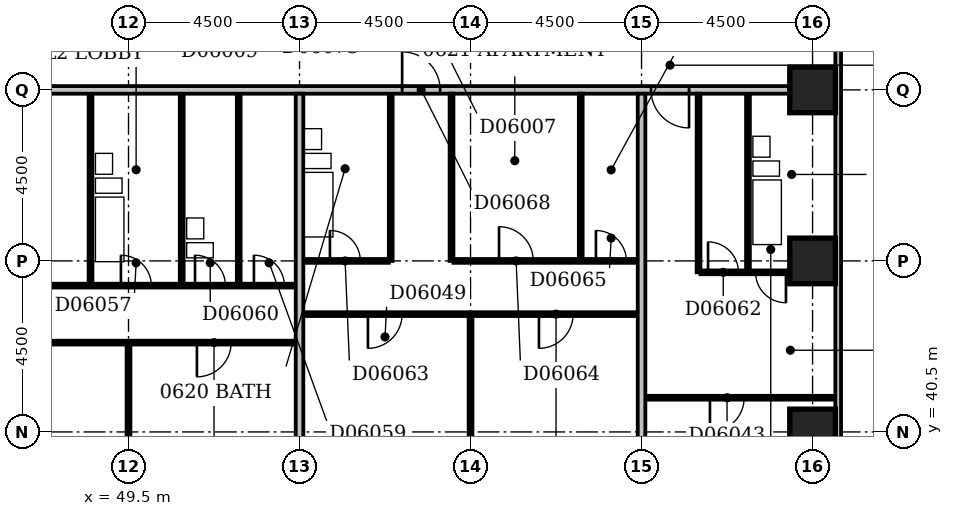
"""IFC4 building model, lengths in metres.
Left out: names, types, materials, properties, quantities, classifications, styles, units other than length and angle.
Written with IfcOpenShell. Run it as: python <this file> out.ifc"""

import sys

from ifc_helpers import new_model, si_unit, direction, frame, frame_2d, origin, origin_2d, place, context, subcontext, project, spatial, rectangle, extrude, element, fill, save


model = new_model("IFC4")
c1 = context("Model", 3, precision=1e-05, world=origin(), true_north=direction((0.0, 1.0)))
c2 = subcontext(c1, "Body", "Model", "MODEL_VIEW")
j1 = project(units=[si_unit("LENGTHUNIT", "METRE"), si_unit("PLANEANGLEUNIT", "RADIAN")], contexts=[c1])
p1 = place(None, origin())
s1 = spatial("IfcSite", under=j1, at=p1, CompositionType="ELEMENT")
p2 = place(p1, origin())
s2 = spatial("IfcBuilding", under=s1, at=p2, CompositionType="ELEMENT")
p3 = place(p2, frame((0.0, 0.0, 32.6)))
s3 = spatial("IfcBuildingStorey", under=s2, at=p3, CompositionType="ELEMENT", Elevation=32.6)
for number, where, z_axis, x_axis in (
    (1, (67.5, 40.5, -0.3), (0.0, 0.0, 1.0), (1.0, 0.0, 0.0)),
    (2, (67.5, 45.0, -0.3), (0.0, 0.0, 1.0), (1.0, 0.0, 0.0)),
    (3, (67.5, 49.5, -0.3), (0.0, 0.0, 1.0), (1.0, 0.0, 0.0)),
):
    element("IfcColumn", number, at=place(p3, frame(where, z_axis=z_axis, x_axis=x_axis)), inside=s3, PredefinedType="COLUMN", context=c2, shape_type="SweptSolid", body=[
        extrude(rectangle(XDim=1.2, YDim=1.2, at=origin_2d()), origin(), (0.0, 0.0, 1.0), 3.6),
    ])
p4 = place(p3, frame((68.175, 35.4, 0.0), z_axis=(0.0, 0.0, 1.0), x_axis=(0.0, 1.0, 0.0)))
e4 = element("IfcWall", 4, at=p4, inside=s3, PredefinedType="STANDARD", context=c2, shape_type="SweptSolid", body=[
    extrude(rectangle(XDim=23.85, YDim=0.15, at=frame_2d((11.925, 0.0))), origin(), (0.0, 0.0, 1.0), 2.7),
])
p5 = place(p4, frame((1.65, 0.0, 0.6)))
e5 = element("IfcOpeningElement", 5, at=p5, cuts=e4, PredefinedType="OPENING", context=c2, shape_type="SweptSolid", body=[
    extrude(rectangle(XDim=2.4, YDim=1.8, at=frame_2d((1.2, 0.9))), frame((0.0, 0.087, 0.0), z_axis=(0.0, -1.0, 0.0), x_axis=(1.0, 0.0, 0.0)), (0.0, 0.0, 1.0), 0.174),
])
p6 = place(p4, frame((19.65, 0.0, 0.6)))
e6 = element("IfcOpeningElement", 6, at=p6, cuts=e4, PredefinedType="OPENING", context=c2, shape_type="SweptSolid", body=[
    extrude(rectangle(XDim=2.4, YDim=1.8, at=frame_2d((1.2, 0.9))), frame((0.0, 0.087, 0.0), z_axis=(0.0, -1.0, 0.0), x_axis=(1.0, 0.0, 0.0)), (0.0, 0.0, 1.0), 0.174),
])
p7 = place(p3, frame((49.5, 36.6, 0.0), z_axis=(0.0, 0.0, 1.0), x_axis=(0.0, 1.0, 0.0)))
e7 = element("IfcWall", 7, at=p7, inside=s3, PredefinedType="PARTITIONING", context=c2, shape_type="SweptSolid", body=[
    extrude(rectangle(XDim=6.2, YDim=0.1, at=frame_2d((3.1, 0.0))), origin(), (0.0, 0.0, 1.0), 3.3),
])
p8 = place(p3, frame((54.0, 36.6, 0.0), z_axis=(0.0, 0.0, 1.0), x_axis=(0.0, 1.0, 0.0)))
e8 = element("IfcWall", 8, at=p8, inside=s3, PredefinedType="PARTITIONING", context=c2, shape_type="SweptSolid", body=[
    extrude(rectangle(XDim=12.8, YDim=0.2, at=frame_2d((6.4, 0.0))), origin(), (0.0, 0.0, 1.0), 2.6),
])
p9 = place(p3, frame((58.5, 36.6, 0.0), z_axis=(0.0, 0.0, 1.0), x_axis=(0.0, 1.0, 0.0)))
e9 = element("IfcWall", 9, at=p9, inside=s3, PredefinedType="PARTITIONING", context=c2, shape_type="SweptSolid", body=[
    extrude(rectangle(XDim=6.95, YDim=0.1, at=frame_2d((3.475, 0.0))), origin(), (0.0, 0.0, 1.0), 3.3),
])
p10 = place(p3, frame((63.0, 36.6, 0.0), z_axis=(0.0, 0.0, 1.0), x_axis=(0.0, 1.0, 0.0)))
e10 = element("IfcWall", 10, at=p10, inside=s3, PredefinedType="PARTITIONING", context=c2, shape_type="SweptSolid", body=[
    extrude(rectangle(XDim=12.8, YDim=0.2, at=frame_2d((6.4, 0.0))), origin(), (0.0, 0.0, 1.0), 2.4),
])
p11 = place(p3, frame((63.1, 41.4, 0.0), z_axis=(0.0, 0.0, 1.0), x_axis=(1.0, 0.0, 0.0)))
e11 = element("IfcWall", 11, at=p11, inside=s3, PredefinedType="PARTITIONING", context=c2, shape_type="SweptSolid", body=[
    extrude(rectangle(XDim=5.0, YDim=0.1, at=frame_2d((2.5, 0.0))), origin(), (0.0, 0.0, 1.0), 3.3),
])
p12 = place(p11, frame((1.7, 0.0, 0.0)))
e12 = element("IfcOpeningElement", 12, at=p12, cuts=e11, PredefinedType="OPENING", context=c2, shape_type="SweptSolid", body=[
    extrude(rectangle(XDim=0.9, YDim=2.1, at=frame_2d((0.45, 1.05))), frame((0.0, 0.062, 0.0), z_axis=(0.0, -1.0, 0.0), x_axis=(1.0, 0.0, 0.0)), (0.0, 0.0, 1.0), 0.124),
])
p13 = place(p3, frame((40.6, 42.85, 0.0), z_axis=(0.0, 0.0, 1.0), x_axis=(1.0, 0.0, 0.0)))
e13 = element("IfcWall", 13, at=p13, inside=s3, PredefinedType="PARTITIONING", context=c2, shape_type="SweptSolid", body=[
    extrude(rectangle(XDim=13.3, YDim=0.1, at=frame_2d((6.65, 0.0))), origin(), (0.0, 0.0, 1.0), 3.3),
])
p14 = place(p13, frame((3.9, 0.0, 0.0)))
e14 = element("IfcOpeningElement", 14, at=p14, cuts=e13, PredefinedType="OPENING", context=c2, shape_type="SweptSolid", body=[
    extrude(rectangle(XDim=0.9, YDim=2.1, at=frame_2d((0.45, 1.05))), frame((0.0, 0.062, 0.0), z_axis=(0.0, -1.0, 0.0), x_axis=(1.0, 0.0, 0.0)), (0.0, 0.0, 1.0), 0.124),
])
p15 = place(p13, frame((10.7, 0.0, 0.0)))
e15 = element("IfcOpeningElement", 15, at=p15, cuts=e13, PredefinedType="OPENING", context=c2, shape_type="SweptSolid", body=[
    extrude(rectangle(XDim=0.9, YDim=2.1, at=frame_2d((0.45, 1.05))), frame((0.0, 0.062, 0.0), z_axis=(0.0, -1.0, 0.0), x_axis=(1.0, 0.0, 0.0)), (0.0, 0.0, 1.0), 0.124),
])
p16 = place(p3, frame((54.1, 43.6, 0.0), z_axis=(0.0, 0.0, 1.0), x_axis=(1.0, 0.0, 0.0)))
e16 = element("IfcWall", 16, at=p16, inside=s3, PredefinedType="PARTITIONING", context=c2, shape_type="SweptSolid", body=[
    extrude(rectangle(XDim=8.8, YDim=0.1, at=frame_2d((4.4, 0.0))), origin(), (0.0, 0.0, 1.0), 3.3),
])
p17 = place(p16, frame((1.7, 0.0, 0.0)))
e17 = element("IfcOpeningElement", 17, at=p17, cuts=e16, PredefinedType="OPENING", context=c2, shape_type="SweptSolid", body=[
    extrude(rectangle(XDim=0.9, YDim=2.1, at=frame_2d((0.45, 1.05))), frame((0.0, 0.062, 0.0), z_axis=(0.0, -1.0, 0.0), x_axis=(1.0, 0.0, 0.0)), (0.0, 0.0, 1.0), 0.124),
])
p18 = place(p16, frame((6.2, 0.0, 0.0)))
e18 = element("IfcOpeningElement", 18, at=p18, cuts=e16, PredefinedType="OPENING", context=c2, shape_type="SweptSolid", body=[
    extrude(rectangle(XDim=0.9, YDim=2.1, at=frame_2d((0.45, 1.05))), frame((0.0, 0.062, 0.0), z_axis=(0.0, -1.0, 0.0), x_axis=(1.0, 0.0, 0.0)), (0.0, 0.0, 1.0), 0.124),
])
p19 = place(p3, frame((42.15, 44.35, 0.0), z_axis=(0.0, 0.0, 1.0), x_axis=(1.0, 0.0, 0.0)))
e19 = element("IfcWall", 19, at=p19, inside=s3, PredefinedType="PARTITIONING", context=c2, shape_type="SweptSolid", body=[
    extrude(rectangle(XDim=11.75, YDim=0.1, at=frame_2d((5.875, 0.0))), origin(), (0.0, 0.0, 1.0), 3.3),
])
p20 = place(p19, frame((7.15, 0.0, 0.0)))
e20 = element("IfcOpeningElement", 20, at=p20, cuts=e19, PredefinedType="OPENING", context=c2, shape_type="SweptSolid", body=[
    extrude(rectangle(XDim=0.8, YDim=2.1, at=frame_2d((0.4, 1.05))), frame((0.0, 0.062, 0.0), z_axis=(0.0, -1.0, 0.0), x_axis=(1.0, 0.0, 0.0)), (0.0, 0.0, 1.0), 0.124),
])
p21 = place(p19, frame((2.7, 0.0, 0.0)))
e21 = element("IfcOpeningElement", 21, at=p21, cuts=e19, PredefinedType="OPENING", context=c2, shape_type="SweptSolid", body=[
    extrude(rectangle(XDim=0.9, YDim=2.1, at=frame_2d((0.45, 1.05))), frame((0.0, 0.062, 0.0), z_axis=(0.0, -1.0, 0.0), x_axis=(1.0, 0.0, 0.0)), (0.0, 0.0, 1.0), 0.124),
])
p22 = place(p19, frame((10.65, 0.0, 0.0)))
e22 = element("IfcOpeningElement", 22, at=p22, cuts=e19, PredefinedType="OPENING", context=c2, shape_type="SweptSolid", body=[
    extrude(rectangle(XDim=0.8, YDim=2.1, at=frame_2d((0.4, 1.05))), frame((0.0, 0.062, 0.0), z_axis=(0.0, -1.0, 0.0), x_axis=(1.0, 0.0, 0.0)), (0.0, 0.0, 1.0), 0.124),
])
p23 = place(p19, frame((9.1, 0.0, 0.0)))
e23 = element("IfcOpeningElement", 23, at=p23, cuts=e19, PredefinedType="OPENING", context=c2, shape_type="SweptSolid", body=[
    extrude(rectangle(XDim=0.8, YDim=2.1, at=frame_2d((0.4, 1.05))), frame((0.0, 0.062, 0.0), z_axis=(0.0, -1.0, 0.0), x_axis=(1.0, 0.0, 0.0)), (0.0, 0.0, 1.0), 0.124),
])
for number, where, z_axis, x_axis in (
    (24, (48.5, 44.4, 0.0), (0.0, 0.0, 1.0), (0.0, 1.0, 0.0)),
    (25, (50.9, 44.4, 0.0), (0.0, 0.0, 1.0), (0.0, 1.0, 0.0)),
    (26, (52.4, 44.4, 0.0), (0.0, 0.0, 1.0), (0.0, 1.0, 0.0)),
):
    element("IfcWall", number, at=place(p3, frame(where, z_axis=z_axis, x_axis=x_axis)), inside=s3, PredefinedType="PLUMBINGWALL", context=c2, shape_type="SweptSolid", body=[
        extrude(rectangle(XDim=5.0, YDim=0.1, at=frame_2d((2.5, 0.0))), origin(), (0.0, 0.0, 1.0), 3.3),
    ])
p24 = place(p3, frame((64.5, 44.7, 0.0), z_axis=(0.0, 0.0, 1.0), x_axis=(0.0, 1.0, 0.0)))
e27 = element("IfcWall", 27, at=p24, inside=s3, PredefinedType="PARTITIONING", context=c2, shape_type="SweptSolid", body=[
    extrude(rectangle(XDim=4.7, YDim=0.1, at=frame_2d((2.35, 0.0))), origin(), (0.0, 0.0, 1.0), 3.3),
])
p25 = place(p3, frame((64.55, 44.7, 0.0), z_axis=(0.0, 0.0, 1.0), x_axis=(1.0, 0.0, 0.0)))
e28 = element("IfcWall", 28, at=p25, inside=s3, PredefinedType="PARTITIONING", context=c2, shape_type="SweptSolid", body=[
    extrude(rectangle(XDim=2.35, YDim=0.1, at=frame_2d((1.175, 0.0))), origin(), (0.0, 0.0, 1.0), 3.3),
])
p26 = place(p25, frame((1.45, 0.0, 0.0)))
e29 = element("IfcOpeningElement", 29, at=p26, cuts=e28, PredefinedType="OPENING", context=c2, shape_type="SweptSolid", body=[
    extrude(rectangle(XDim=0.8, YDim=2.1, at=frame_2d((0.4, 1.05))), frame((0.0, 0.062, 0.0), z_axis=(0.0, -1.0, 0.0), x_axis=(1.0, 0.0, 0.0)), (0.0, 0.0, 1.0), 0.124),
])
p27 = place(p25, frame((0.2, 0.0, 0.0)))
e30 = element("IfcOpeningElement", 30, at=p27, cuts=e28, PredefinedType="OPENING", context=c2, shape_type="SweptSolid", body=[
    extrude(rectangle(XDim=0.8, YDim=2.1, at=frame_2d((0.4, 1.05))), frame((0.0, 0.062, 0.0), z_axis=(0.0, -1.0, 0.0), x_axis=(1.0, 0.0, 0.0)), (0.0, 0.0, 1.0), 0.124),
])
p28 = place(p3, frame((65.8, 44.75, 0.0), z_axis=(0.0, 0.0, 1.0), x_axis=(0.0, 1.0, 0.0)))
e31 = element("IfcWall", 31, at=p28, inside=s3, PredefinedType="PLUMBINGWALL", context=c2, shape_type="SweptSolid", body=[
    extrude(rectangle(XDim=4.65, YDim=0.1, at=frame_2d((2.325, 0.0))), origin(), (0.0, 0.0, 1.0), 3.3),
])
p29 = place(p3, frame((54.1, 45.0, 0.0), z_axis=(0.0, 0.0, 1.0), x_axis=(1.0, 0.0, 0.0)))
e32 = element("IfcWall", 32, at=p29, inside=s3, PredefinedType="PARTITIONING", context=c2, shape_type="SweptSolid", body=[
    extrude(rectangle(XDim=2.25, YDim=0.1, at=frame_2d((1.125, 0.0))), origin(), (0.0, 0.0, 1.0), 3.3),
])
p30 = place(p29, frame((0.7, 0.0, 0.0)))
e33 = element("IfcOpeningElement", 33, at=p30, cuts=e32, PredefinedType="OPENING", context=c2, shape_type="SweptSolid", body=[
    extrude(rectangle(XDim=0.8, YDim=2.1, at=frame_2d((0.4, 1.05))), frame((0.0, 0.062, 0.0), z_axis=(0.0, -1.0, 0.0), x_axis=(1.0, 0.0, 0.0)), (0.0, 0.0, 1.0), 0.124),
])
p31 = place(p3, frame((56.4, 45.0, 0.0), z_axis=(0.0, 0.0, 1.0), x_axis=(0.0, 1.0, 0.0)))
e34 = element("IfcWall", 34, at=p31, inside=s3, PredefinedType="PLUMBINGWALL", context=c2, shape_type="SweptSolid", body=[
    extrude(rectangle(XDim=4.4, YDim=0.1, at=frame_2d((2.2, 0.0))), origin(), (0.0, 0.0, 1.0), 3.3),
])
p32 = place(p3, frame((58.0, 45.0, 0.0), z_axis=(0.0, 0.0, 1.0), x_axis=(0.0, 1.0, 0.0)))
e35 = element("IfcWall", 35, at=p32, inside=s3, PredefinedType="PARTITIONING", context=c2, shape_type="SweptSolid", body=[
    extrude(rectangle(XDim=4.4, YDim=0.1, at=frame_2d((2.2, 0.0))), origin(), (0.0, 0.0, 1.0), 3.3),
])
p33 = place(p3, frame((58.05, 45.0, 0.0), z_axis=(0.0, 0.0, 1.0), x_axis=(1.0, 0.0, 0.0)))
e36 = element("IfcWall", 36, at=p33, inside=s3, PredefinedType="PARTITIONING", context=c2, shape_type="SweptSolid", body=[
    extrude(rectangle(XDim=4.85, YDim=0.1, at=frame_2d((2.425, 0.0))), origin(), (0.0, 0.0, 1.0), 3.3),
])
p34 = place(p33, frame((1.2, 0.0, 0.0)))
e37 = element("IfcOpeningElement", 37, at=p34, cuts=e36, PredefinedType="OPENING", context=c2, shape_type="SweptSolid", body=[
    extrude(rectangle(XDim=0.9, YDim=2.1, at=frame_2d((0.45, 1.05))), frame((0.0, 0.062, 0.0), z_axis=(0.0, -1.0, 0.0), x_axis=(1.0, 0.0, 0.0)), (0.0, 0.0, 1.0), 0.124),
])
p35 = place(p33, frame((3.75, 0.0, 0.0)))
e38 = element("IfcOpeningElement", 38, at=p35, cuts=e36, PredefinedType="OPENING", context=c2, shape_type="SweptSolid", body=[
    extrude(rectangle(XDim=0.8, YDim=2.1, at=frame_2d((0.4, 1.05))), frame((0.0, 0.062, 0.0), z_axis=(0.0, -1.0, 0.0), x_axis=(1.0, 0.0, 0.0)), (0.0, 0.0, 1.0), 0.124),
])
p36 = place(p3, frame((61.4, 45.05, 0.0), z_axis=(0.0, 0.0, 1.0), x_axis=(0.0, 1.0, 0.0)))
e39 = element("IfcWall", 39, at=p36, inside=s3, PredefinedType="PARTITIONING", context=c2, shape_type="SweptSolid", body=[
    extrude(rectangle(XDim=4.35, YDim=0.1, at=frame_2d((2.175, 0.0))), origin(), (0.0, 0.0, 1.0), 3.3),
])
p37 = place(p3, frame((9.1, 49.5, 0.0), z_axis=(0.0, 0.0, 1.0), x_axis=(1.0, 0.0, 0.0)))
e40 = element("IfcWall", 40, at=p37, inside=s3, PredefinedType="PARTITIONING", context=c2, shape_type="SweptSolid", body=[
    extrude(rectangle(XDim=57.8, YDim=0.2, at=frame_2d((28.9, 0.0))), origin(), (0.0, 0.0, 1.0), 3.3),
])
p38 = place(p37, frame((20.6, 0.0, 0.0)))
e41 = element("IfcOpeningElement", 41, at=p38, cuts=e40, PredefinedType="OPENING", context=c2, shape_type="SweptSolid", body=[
    extrude(rectangle(XDim=1.0, YDim=2.1, at=frame_2d((0.5, 1.05))), frame((0.0, 0.112, 0.0), z_axis=(0.0, -1.0, 0.0), x_axis=(1.0, 0.0, 0.0)), (0.0, 0.0, 1.0), 0.224),
])
p39 = place(p37, frame((31.7, 0.0, 0.0)))
e42 = element("IfcOpeningElement", 42, at=p39, cuts=e40, PredefinedType="OPENING", context=c2, shape_type="SweptSolid", body=[
    extrude(rectangle(XDim=1.0, YDim=2.1, at=frame_2d((0.5, 1.05))), frame((0.0, 0.112, 0.0), z_axis=(0.0, -1.0, 0.0), x_axis=(1.0, 0.0, 0.0)), (0.0, 0.0, 1.0), 0.224),
])
p40 = place(p37, frame((47.6, 0.0, 0.0)))
e43 = element("IfcOpeningElement", 43, at=p40, cuts=e40, PredefinedType="OPENING", context=c2, shape_type="SweptSolid", body=[
    extrude(rectangle(XDim=1.0, YDim=2.1, at=frame_2d((0.5, 1.05))), frame((0.0, 0.112, 0.0), z_axis=(0.0, -1.0, 0.0), x_axis=(1.0, 0.0, 0.0)), (0.0, 0.0, 1.0), 0.224),
])
p41 = place(p37, frame((54.15, 0.0, 0.0)))
e44 = element("IfcOpeningElement", 44, at=p41, cuts=e40, PredefinedType="OPENING", context=c2, shape_type="SweptSolid", body=[
    extrude(rectangle(XDim=1.0, YDim=2.1, at=frame_2d((0.5, 1.05))), frame((0.0, 0.112, 0.0), z_axis=(0.0, -1.0, 0.0), x_axis=(1.0, 0.0, 0.0)), (0.0, 0.0, 1.0), 0.224),
])
p42 = place(p37, frame((10.65, 0.0, 0.0)))
e45 = element("IfcOpeningElement", 45, at=p42, cuts=e40, PredefinedType="OPENING", context=c2, shape_type="SweptSolid", body=[
    extrude(rectangle(XDim=0.9, YDim=2.1, at=frame_2d((0.45, 1.05))), frame((0.0, 0.112, 0.0), z_axis=(0.0, -1.0, 0.0), x_axis=(1.0, 0.0, 0.0)), (0.0, 0.0, 1.0), 0.224),
])
p43 = place(p12, frame((0.9, 0.0, 0.0), z_axis=(0.0, 0.0, 1.0), x_axis=(-1.0, 0.0, 0.0)))
e46 = element("IfcDoor", 46, at=p43, inside=s3, OperationType="SINGLE_SWING_RIGHT", PredefinedType="DOOR", context=c2, shape_type="SweptSolid", body=[
    extrude(rectangle(XDim=0.9, YDim=2.1, at=frame_2d((0.45, 1.05))), frame((0.0, 0.025, 0.0), z_axis=(0.0, -1.0, 0.0), x_axis=(1.0, 0.0, 0.0)), (0.0, 0.0, 1.0), 0.05),
])
fill(e12, e46)
p44 = place(p15, frame((0.9, 0.0, 0.0), z_axis=(0.0, 0.0, 1.0), x_axis=(-1.0, 0.0, 0.0)))
e47 = element("IfcDoor", 47, at=p44, inside=s3, OperationType="SINGLE_SWING_RIGHT", PredefinedType="DOOR", context=c2, shape_type="SweptSolid", body=[
    extrude(rectangle(XDim=0.9, YDim=2.1, at=frame_2d((0.45, 1.05))), frame((0.0, 0.025, 0.0), z_axis=(0.0, -1.0, 0.0), x_axis=(1.0, 0.0, 0.0)), (0.0, 0.0, 1.0), 0.05),
])
fill(e15, e47)
p45 = place(p17, frame((0.9, 0.0, 0.0), z_axis=(0.0, 0.0, 1.0), x_axis=(-1.0, 0.0, 0.0)))
e48 = element("IfcDoor", 48, at=p45, inside=s3, OperationType="SINGLE_SWING_RIGHT", PredefinedType="DOOR", context=c2, shape_type="SweptSolid", body=[
    extrude(rectangle(XDim=0.9, YDim=2.1, at=frame_2d((0.45, 1.05))), frame((0.0, 0.025, 0.0), z_axis=(0.0, -1.0, 0.0), x_axis=(1.0, 0.0, 0.0)), (0.0, 0.0, 1.0), 0.05),
])
fill(e17, e48)
p46 = place(p18, frame((0.9, 0.0, 0.0), z_axis=(0.0, 0.0, 1.0), x_axis=(-1.0, 0.0, 0.0)))
e49 = element("IfcDoor", 49, at=p46, inside=s3, OperationType="SINGLE_SWING_RIGHT", PredefinedType="DOOR", context=c2, shape_type="SweptSolid", body=[
    extrude(rectangle(XDim=0.9, YDim=2.1, at=frame_2d((0.45, 1.05))), frame((0.0, 0.025, 0.0), z_axis=(0.0, -1.0, 0.0), x_axis=(1.0, 0.0, 0.0)), (0.0, 0.0, 1.0), 0.05),
])
fill(e18, e49)
p47 = place(p20, origin())
e50 = element("IfcDoor", 50, at=p47, inside=s3, OperationType="SINGLE_SWING_LEFT", PredefinedType="DOOR", context=c2, shape_type="SweptSolid", body=[
    extrude(rectangle(XDim=0.8, YDim=2.1, at=frame_2d((0.4, 1.05))), frame((0.0, 0.025, 0.0), z_axis=(0.0, -1.0, 0.0), x_axis=(1.0, 0.0, 0.0)), (0.0, 0.0, 1.0), 0.05),
])
fill(e20, e50)
p48 = place(p22, origin())
e51 = element("IfcDoor", 51, at=p48, inside=s3, OperationType="SINGLE_SWING_LEFT", PredefinedType="DOOR", context=c2, shape_type="SweptSolid", body=[
    extrude(rectangle(XDim=0.8, YDim=2.1, at=frame_2d((0.4, 1.05))), frame((0.0, 0.025, 0.0), z_axis=(0.0, -1.0, 0.0), x_axis=(1.0, 0.0, 0.0)), (0.0, 0.0, 1.0), 0.05),
])
fill(e22, e51)
p49 = place(p23, origin())
e52 = element("IfcDoor", 52, at=p49, inside=s3, OperationType="SINGLE_SWING_LEFT", PredefinedType="DOOR", context=c2, shape_type="SweptSolid", body=[
    extrude(rectangle(XDim=0.8, YDim=2.1, at=frame_2d((0.4, 1.05))), frame((0.0, 0.025, 0.0), z_axis=(0.0, -1.0, 0.0), x_axis=(1.0, 0.0, 0.0)), (0.0, 0.0, 1.0), 0.05),
])
fill(e23, e52)
p50 = place(p26, origin())
e53 = element("IfcDoor", 53, at=p50, inside=s3, OperationType="SINGLE_SWING_RIGHT", PredefinedType="DOOR", context=c2, shape_type="SweptSolid", body=[
    extrude(rectangle(XDim=0.8, YDim=2.1, at=frame_2d((0.4, 1.05))), frame((0.0, 0.025, 0.0), z_axis=(0.0, -1.0, 0.0), x_axis=(1.0, 0.0, 0.0)), (0.0, 0.0, 1.0), 0.05),
])
fill(e29, e53)
p51 = place(p27, origin())
e54 = element("IfcDoor", 54, at=p51, inside=s3, OperationType="SINGLE_SWING_LEFT", PredefinedType="DOOR", context=c2, shape_type="SweptSolid", body=[
    extrude(rectangle(XDim=0.8, YDim=2.1, at=frame_2d((0.4, 1.05))), frame((0.0, 0.025, 0.0), z_axis=(0.0, -1.0, 0.0), x_axis=(1.0, 0.0, 0.0)), (0.0, 0.0, 1.0), 0.05),
])
fill(e30, e54)
p52 = place(p30, origin())
e55 = element("IfcDoor", 55, at=p52, inside=s3, OperationType="SINGLE_SWING_LEFT", PredefinedType="DOOR", context=c2, shape_type="SweptSolid", body=[
    extrude(rectangle(XDim=0.8, YDim=2.1, at=frame_2d((0.4, 1.05))), frame((0.0, 0.025, 0.0), z_axis=(0.0, -1.0, 0.0), x_axis=(1.0, 0.0, 0.0)), (0.0, 0.0, 1.0), 0.05),
])
fill(e33, e55)
p53 = place(p34, origin())
e56 = element("IfcDoor", 56, at=p53, inside=s3, OperationType="SINGLE_SWING_LEFT", PredefinedType="DOOR", context=c2, shape_type="SweptSolid", body=[
    extrude(rectangle(XDim=0.9, YDim=2.1, at=frame_2d((0.45, 1.05))), frame((0.0, 0.025, 0.0), z_axis=(0.0, -1.0, 0.0), x_axis=(1.0, 0.0, 0.0)), (0.0, 0.0, 1.0), 0.05),
])
fill(e37, e56)
p54 = place(p35, origin())
e57 = element("IfcDoor", 57, at=p54, inside=s3, OperationType="SINGLE_SWING_LEFT", PredefinedType="DOOR", context=c2, shape_type="SweptSolid", body=[
    extrude(rectangle(XDim=0.8, YDim=2.1, at=frame_2d((0.4, 1.05))), frame((0.0, 0.025, 0.0), z_axis=(0.0, -1.0, 0.0), x_axis=(1.0, 0.0, 0.0)), (0.0, 0.0, 1.0), 0.05),
])
fill(e38, e57)
p55 = place(p40, origin())
e58 = element("IfcDoor", 58, at=p55, inside=s3, OperationType="SINGLE_SWING_LEFT", PredefinedType="DOOR", context=c2, shape_type="SweptSolid", body=[
    extrude(rectangle(XDim=1.0, YDim=2.1, at=frame_2d((0.5, 1.05))), frame((0.0, 0.025, 0.0), z_axis=(0.0, -1.0, 0.0), x_axis=(1.0, 0.0, 0.0)), (0.0, 0.0, 1.0), 0.05),
])
fill(e43, e58)
p56 = place(p41, origin())
e59 = element("IfcDoor", 59, at=p56, inside=s3, OperationType="SINGLE_SWING_RIGHT", PredefinedType="DOOR", context=c2, shape_type="SweptSolid", body=[
    extrude(rectangle(XDim=1.0, YDim=2.1, at=frame_2d((0.5, 1.05))), frame((0.0, 0.025, 0.0), z_axis=(0.0, -1.0, 0.0), x_axis=(1.0, 0.0, 0.0)), (0.0, 0.0, 1.0), 0.05),
])
fill(e44, e59)
save(model, sys.argv[1])
